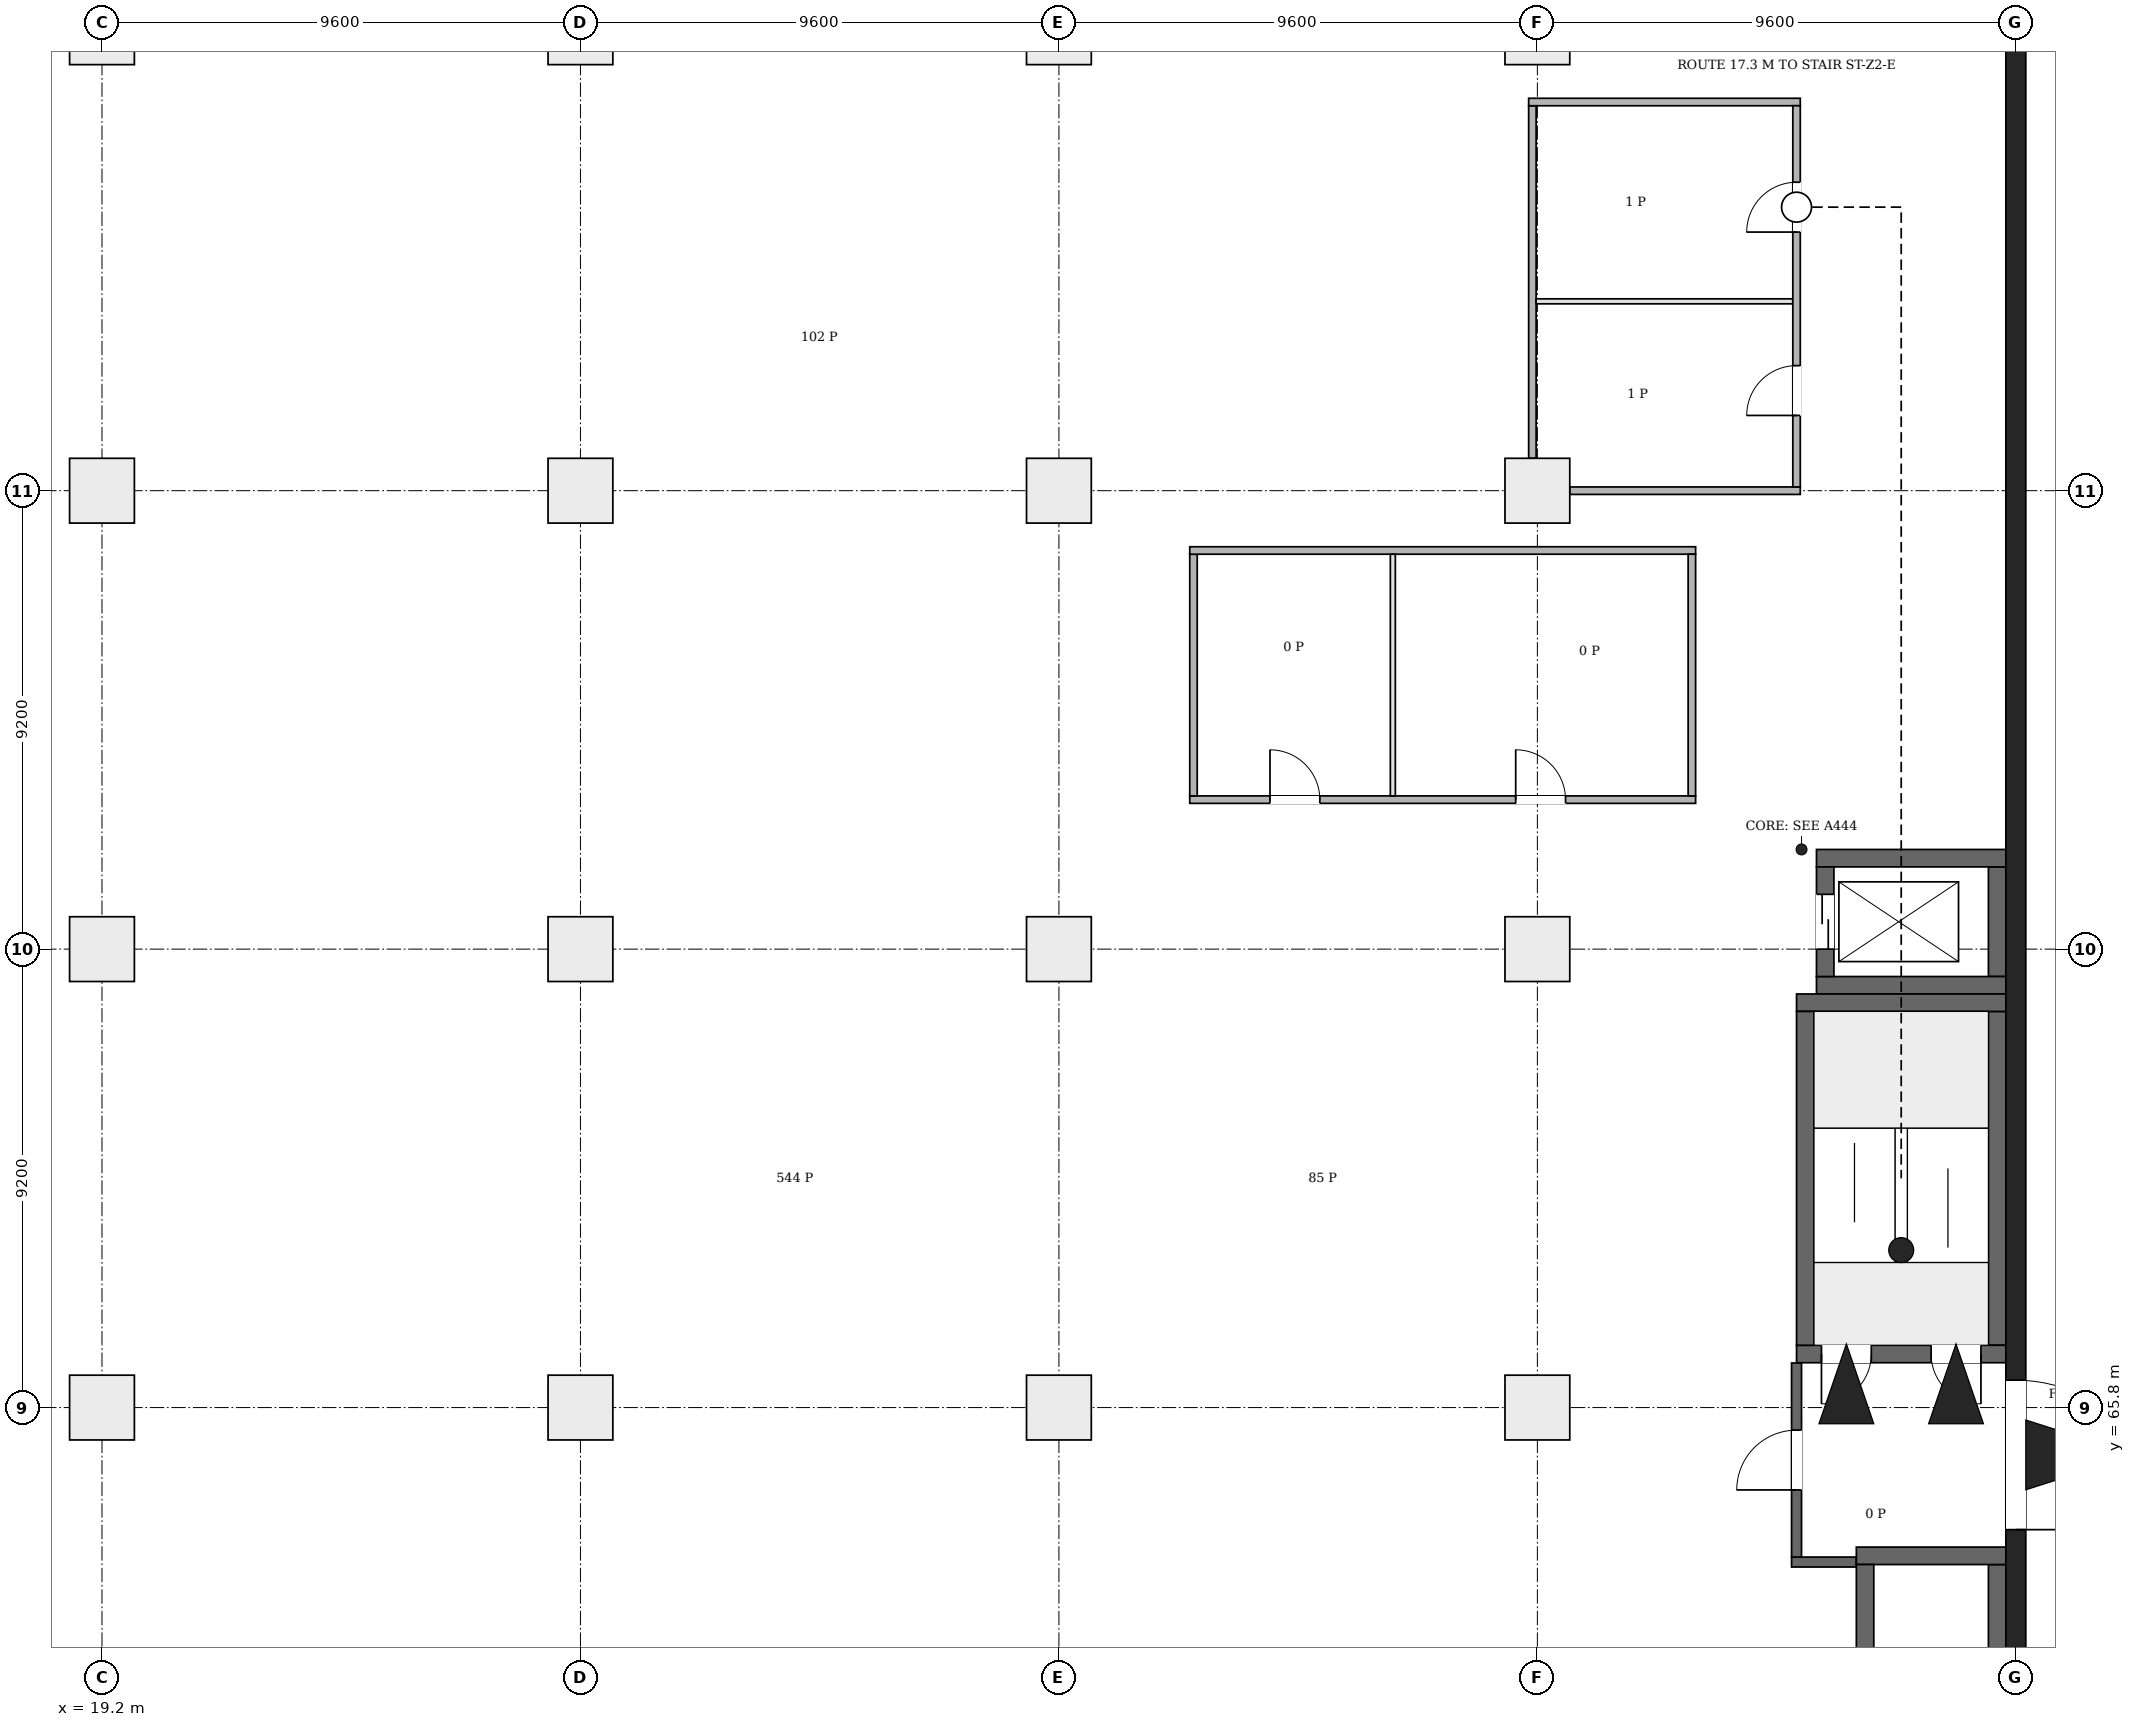
"""IFC4 building model, lengths in metres.
Left out: names, types, materials, properties, quantities, classifications, styles, units other than length and angle.
Written with IfcOpenShell. Run it as: python <this file> out.ifc"""

import sys

from ifc_helpers import new_model, si_unit, direction, frame, frame_2d, origin, origin_2d, place, context, subcontext, project, spatial, rectangle, extrude, element, fill, save


model = new_model("IFC4")
c1 = context("Model", 3, precision=1e-05, world=origin(), true_north=direction((0.0, 1.0)))
c2 = subcontext(c1, "Body", "Model", "MODEL_VIEW")
j1 = project(units=[si_unit("LENGTHUNIT", "METRE"), si_unit("PLANEANGLEUNIT", "RADIAN")], contexts=[c1])
p1 = place(None, origin())
s1 = spatial("IfcSite", under=j1, at=p1, CompositionType="ELEMENT")
p2 = place(p1, origin())
s2 = spatial("IfcBuilding", under=s1, at=p2, CompositionType="ELEMENT")
p3 = place(p2, origin())
s3 = spatial("IfcBuildingStorey", under=s2, at=p3, CompositionType="ELEMENT", Elevation=0.0)
p4 = place(p3, frame((57.6, 46.72, 0.0), z_axis=(0.0, 0.0, 1.0), x_axis=(0.0, 1.0, 0.0)))
e1 = element("IfcWall", 1, at=p4, inside=s3, PredefinedType="SHEAR", context=c2, shape_type="SweptSolid", body=[
    extrude(rectangle(XDim=47.36, YDim=0.4, at=frame_2d((23.68, 0.0))), origin(), (0.0, 0.0, 1.0), 6.5),
])
p5 = place(p4, frame((16.63, 0.0, 0.0)))
e2 = element("IfcOpeningElement", 2, at=p5, cuts=e1, PredefinedType="OPENING", context=c2, shape_type="SweptSolid", body=[
    extrude(rectangle(XDim=3.0, YDim=2.4, at=frame_2d((1.5, 1.2))), frame((0.0, 0.21, 0.0), z_axis=(0.0, -1.0, 0.0), x_axis=(1.0, 0.0, 0.0)), (0.0, 0.0, 1.0), 0.42),
])
p6 = place(p3, frame((53.2, 66.875, 0.0), z_axis=(0.0, 0.0, 1.0), x_axis=(1.0, 0.0, 0.0)))
e3 = element("IfcWall", 3, at=p6, inside=s3, PredefinedType="SHEAR", context=c2, shape_type="SweptSolid", body=[
    extrude(rectangle(XDim=4.2, YDim=0.35, at=frame_2d((2.1, 0.0))), origin(), (0.0, 0.0, 1.0), 6.5),
])
p7 = place(p6, frame((0.5, 0.0, 0.0)))
e4 = element("IfcOpeningElement", 4, at=p7, cuts=e3, PredefinedType="OPENING", context=c2, shape_type="SweptSolid", body=[
    extrude(rectangle(XDim=1.0, YDim=2.1, at=frame_2d((0.5, 1.05))), frame((0.0, 0.185, 0.0), z_axis=(0.0, -1.0, 0.0), x_axis=(1.0, 0.0, 0.0)), (0.0, 0.0, 1.0), 0.37),
])
p8 = place(p6, frame((2.7, 0.0, 0.0)))
e5 = element("IfcOpeningElement", 5, at=p8, cuts=e3, PredefinedType="OPENING", context=c2, shape_type="SweptSolid", body=[
    extrude(rectangle(XDim=1.0, YDim=2.1, at=frame_2d((0.5, 1.05))), frame((0.0, 0.185, 0.0), z_axis=(0.0, -1.0, 0.0), x_axis=(1.0, 0.0, 0.0)), (0.0, 0.0, 1.0), 0.37),
])
p9 = place(p3, frame((53.2, 73.925, 0.0), z_axis=(0.0, 0.0, 1.0), x_axis=(1.0, 0.0, 0.0)))
e6 = element("IfcWall", 6, at=p9, inside=s3, PredefinedType="SHEAR", context=c2, shape_type="SweptSolid", body=[
    extrude(rectangle(XDim=4.2, YDim=0.35, at=frame_2d((2.1, 0.0))), origin(), (0.0, 0.0, 1.0), 6.5),
])
for number, where, z_axis, x_axis in (
    (7, (53.375, 67.05, 0.0), (0.0, 0.0, 1.0), (0.0, 1.0, 0.0)),
    (8, (57.225, 67.05, 0.0), (0.0, 0.0, 1.0), (0.0, 1.0, 0.0)),
):
    element("IfcWall", number, at=place(p3, frame(where, z_axis=z_axis, x_axis=x_axis)), inside=s3, PredefinedType="SHEAR", context=c2, shape_type="SweptSolid", body=[
        extrude(rectangle(XDim=6.7, YDim=0.35, at=frame_2d((3.35, 0.0))), origin(), (0.0, 0.0, 1.0), 6.5),
    ])
for number, where, z_axis, x_axis in (
    (9, (53.6, 74.275, 0.0), (0.0, 0.0, 1.0), (1.0, 0.0, 0.0)),
    (10, (53.6, 76.825, 0.0), (0.0, 0.0, 1.0), (1.0, 0.0, 0.0)),
):
    element("IfcWall", number, at=place(p3, frame(where, z_axis=z_axis, x_axis=x_axis)), inside=s3, PredefinedType="SHEAR", context=c2, shape_type="SweptSolid", body=[
        extrude(rectangle(XDim=3.8, YDim=0.35, at=frame_2d((1.9, 0.0))), origin(), (0.0, 0.0, 1.0), 6.5),
    ])
p10 = place(p3, frame((53.775, 74.45, 0.0), z_axis=(0.0, 0.0, 1.0), x_axis=(0.0, 1.0, 0.0)))
e11 = element("IfcWall", 11, at=p10, inside=s3, PredefinedType="SHEAR", context=c2, shape_type="SweptSolid", body=[
    extrude(rectangle(XDim=2.2, YDim=0.35, at=frame_2d((1.1, 0.0))), origin(), (0.0, 0.0, 1.0), 6.5),
])
p11 = place(p10, frame((0.55, 0.0, 0.0)))
e12 = element("IfcOpeningElement", 12, at=p11, cuts=e11, PredefinedType="OPENING", context=c2, shape_type="SweptSolid", body=[
    extrude(rectangle(XDim=1.1, YDim=2.1, at=frame_2d((0.55, 1.05))), frame((0.0, 0.185, 0.0), z_axis=(0.0, -1.0, 0.0), x_axis=(1.0, 0.0, 0.0)), (0.0, 0.0, 1.0), 0.37),
])
p12 = place(p3, frame((57.225, 74.45, 0.0), z_axis=(0.0, 0.0, 1.0), x_axis=(0.0, 1.0, 0.0)))
e13 = element("IfcWall", 13, at=p12, inside=s3, PredefinedType="SHEAR", context=c2, shape_type="SweptSolid", body=[
    extrude(rectangle(XDim=2.2, YDim=0.35, at=frame_2d((1.1, 0.0))), origin(), (0.0, 0.0, 1.0), 6.5),
])
p13 = place(p3, frame((54.4, 62.825, 0.0), z_axis=(0.0, 0.0, 1.0), x_axis=(1.0, 0.0, 0.0)))
e14 = element("IfcWall", 14, at=p13, inside=s3, PredefinedType="SHEAR", context=c2, shape_type="SweptSolid", body=[
    extrude(rectangle(XDim=3.0, YDim=0.35, at=frame_2d((1.5, 0.0))), origin(), (0.0, 0.0, 1.0), 6.5),
])
for number, where, z_axis, x_axis in (
    (15, (54.575, 58.35, 0.0), (0.0, 0.0, 1.0), (0.0, 1.0, 0.0)),
    (16, (57.225, 58.35, 0.0), (0.0, 0.0, 1.0), (0.0, 1.0, 0.0)),
):
    element("IfcWall", number, at=place(p3, frame(where, z_axis=z_axis, x_axis=x_axis)), inside=s3, PredefinedType="SHEAR", context=c2, shape_type="SweptSolid", body=[
        extrude(rectangle(XDim=4.3, YDim=0.35, at=frame_2d((2.15, 0.0))), origin(), (0.0, 0.0, 1.0), 6.5),
    ])
for number, where, z_axis, x_axis in (
    (17, (19.2, 65.8, 0.0), (0.0, 0.0, 1.0), (1.0, 0.0, 0.0)),
    (18, (28.8, 65.8, 0.0), (0.0, 0.0, 1.0), (1.0, 0.0, 0.0)),
    (19, (38.4, 65.8, 0.0), (0.0, 0.0, 1.0), (1.0, 0.0, 0.0)),
    (20, (48.0, 65.8, 0.0), (0.0, 0.0, 1.0), (1.0, 0.0, 0.0)),
    (21, (19.2, 75.0, 0.0), (0.0, 0.0, 1.0), (1.0, 0.0, 0.0)),
    (22, (28.8, 75.0, 0.0), (0.0, 0.0, 1.0), (1.0, 0.0, 0.0)),
    (23, (38.4, 75.0, 0.0), (0.0, 0.0, 1.0), (1.0, 0.0, 0.0)),
    (24, (48.0, 75.0, 0.0), (0.0, 0.0, 1.0), (1.0, 0.0, 0.0)),
    (25, (19.2, 84.2, 0.0), (0.0, 0.0, 1.0), (1.0, 0.0, 0.0)),
    (26, (28.8, 84.2, 0.0), (0.0, 0.0, 1.0), (1.0, 0.0, 0.0)),
    (27, (38.4, 84.2, 0.0), (0.0, 0.0, 1.0), (1.0, 0.0, 0.0)),
    (28, (48.0, 84.2, 0.0), (0.0, 0.0, 1.0), (1.0, 0.0, 0.0)),
    (29, (19.2, 93.4, 0.0), (0.0, 0.0, 1.0), (1.0, 0.0, 0.0)),
    (30, (28.8, 93.4, 0.0), (0.0, 0.0, 1.0), (1.0, 0.0, 0.0)),
    (31, (38.4, 93.4, 0.0), (0.0, 0.0, 1.0), (1.0, 0.0, 0.0)),
    (32, (48.0, 93.4, 0.0), (0.0, 0.0, 1.0), (1.0, 0.0, 0.0)),
):
    element("IfcColumn", number, at=place(p3, frame(where, z_axis=z_axis, x_axis=x_axis)), inside=s3, PredefinedType="COLUMN", context=c2, shape_type="SweptSolid", body=[
        extrude(rectangle(XDim=1.3, YDim=1.3, at=origin_2d()), origin(), (0.0, 0.0, 1.0), 6.5),
    ])
p14 = place(p3, frame((41.025, 78.0, 0.0), z_axis=(0.0, 0.0, 1.0), x_axis=(1.0, 0.0, 0.0)))
e33 = element("IfcWall", 33, at=p14, inside=s3, PredefinedType="PARTITIONING", context=c2, shape_type="SweptSolid", body=[
    extrude(rectangle(XDim=10.15, YDim=0.15, at=frame_2d((5.075, 0.0))), origin(), (0.0, 0.0, 1.0), 6.05),
])
p15 = place(p14, frame((6.54, 0.0, 0.0)))
e34 = element("IfcOpeningElement", 34, at=p15, cuts=e33, PredefinedType="OPENING", context=c2, shape_type="SweptSolid", body=[
    extrude(rectangle(XDim=1.0, YDim=2.1, at=frame_2d((0.5, 1.05))), frame((0.0, 0.085, 0.0), z_axis=(0.0, -1.0, 0.0), x_axis=(1.0, 0.0, 0.0)), (0.0, 0.0, 1.0), 0.17),
])
p16 = place(p14, frame((1.61, 0.0, 0.0)))
e35 = element("IfcOpeningElement", 35, at=p16, cuts=e33, PredefinedType="OPENING", context=c2, shape_type="SweptSolid", body=[
    extrude(rectangle(XDim=1.0, YDim=2.1, at=frame_2d((0.5, 1.05))), frame((0.0, 0.085, 0.0), z_axis=(0.0, -1.0, 0.0), x_axis=(1.0, 0.0, 0.0)), (0.0, 0.0, 1.0), 0.17),
])
p17 = place(p3, frame((41.1, 78.075, 0.0), z_axis=(0.0, 0.0, 1.0), x_axis=(0.0, 1.0, 0.0)))
e36 = element("IfcWall", 36, at=p17, inside=s3, PredefinedType="PARTITIONING", context=c2, shape_type="SweptSolid", body=[
    extrude(rectangle(XDim=4.85, YDim=0.15, at=frame_2d((2.425, 0.0))), origin(), (0.0, 0.0, 1.0), 6.05),
])
p18 = place(p3, frame((41.025, 83.0, 0.0), z_axis=(0.0, 0.0, 1.0), x_axis=(1.0, 0.0, 0.0)))
e37 = element("IfcWall", 37, at=p18, inside=s3, PredefinedType="PARTITIONING", context=c2, shape_type="SweptSolid", body=[
    extrude(rectangle(XDim=10.15, YDim=0.15, at=frame_2d((5.075, 0.0))), origin(), (0.0, 0.0, 1.0), 6.05),
])
p19 = place(p3, frame((45.1, 78.075, 0.0), z_axis=(0.0, 0.0, 1.0), x_axis=(0.0, 1.0, 0.0)))
e38 = element("IfcWall", 38, at=p19, inside=s3, PredefinedType="PARTITIONING", context=c2, shape_type="SweptSolid", body=[
    extrude(rectangle(XDim=4.85, YDim=0.1, at=frame_2d((2.425, 0.0))), origin(), (0.0, 0.0, 1.0), 6.05),
])
p20 = place(p3, frame((47.9, 84.85, 0.0), z_axis=(0.0, 0.0, 1.0), x_axis=(0.0, 1.0, 0.0)))
e39 = element("IfcWall", 39, at=p20, inside=s3, PredefinedType="PARTITIONING", context=c2, shape_type="SweptSolid", body=[
    extrude(rectangle(XDim=7.075, YDim=0.15, at=frame_2d((3.538, 0.0))), origin(), (0.0, 0.0, 1.0), 5.65),
])
p21 = place(p3, frame((47.825, 92.0, 0.0), z_axis=(0.0, 0.0, 1.0), x_axis=(1.0, 0.0, 0.0)))
e40 = element("IfcWall", 40, at=p21, inside=s3, PredefinedType="PARTITIONING", context=c2, shape_type="SweptSolid", body=[
    extrude(rectangle(XDim=5.45, YDim=0.15, at=frame_2d((2.725, 0.0))), origin(), (0.0, 0.0, 1.0), 6.05),
])
p22 = place(p3, frame((47.975, 88.0, 0.0), z_axis=(0.0, 0.0, 1.0), x_axis=(1.0, 0.0, 0.0)))
e41 = element("IfcWall", 41, at=p22, inside=s3, PredefinedType="PARTITIONING", context=c2, shape_type="SweptSolid", body=[
    extrude(rectangle(XDim=5.15, YDim=0.1, at=frame_2d((2.575, 0.0))), origin(), (0.0, 0.0, 1.0), 6.05),
])
p23 = place(p3, frame((48.65, 84.2, 0.0), z_axis=(0.0, 0.0, 1.0), x_axis=(1.0, 0.0, 0.0)))
e42 = element("IfcWall", 42, at=p23, inside=s3, PredefinedType="PARTITIONING", context=c2, shape_type="SweptSolid", body=[
    extrude(rectangle(XDim=4.625, YDim=0.15, at=frame_2d((2.312, 0.0))), origin(), (0.0, 0.0, 1.0), 5.65),
])
p24 = place(p3, frame((51.1, 78.075, 0.0), z_axis=(0.0, 0.0, 1.0), x_axis=(0.0, 1.0, 0.0)))
e43 = element("IfcWall", 43, at=p24, inside=s3, PredefinedType="PARTITIONING", context=c2, shape_type="SweptSolid", body=[
    extrude(rectangle(XDim=4.85, YDim=0.15, at=frame_2d((2.425, 0.0))), origin(), (0.0, 0.0, 1.0), 6.05),
])
p25 = place(p3, frame((53.1, 62.7, 0.0), z_axis=(0.0, 0.0, 1.0), x_axis=(1.0, 0.0, 0.0)))
e44 = element("IfcWall", 44, at=p25, inside=s3, PredefinedType="PARTITIONING", context=c2, shape_type="SweptSolid", body=[
    extrude(rectangle(XDim=1.294, YDim=0.2, at=frame_2d((0.647, 0.0))), origin(), (0.0, 0.0, 1.0), 6.05),
])
p26 = place(p3, frame((53.2, 62.8, 0.0), z_axis=(0.0, 0.0, 1.0), x_axis=(0.0, 1.0, 0.0)))
e45 = element("IfcWall", 45, at=p26, inside=s3, PredefinedType="PARTITIONING", context=c2, shape_type="SweptSolid", body=[
    extrude(rectangle(XDim=3.894, YDim=0.2, at=frame_2d((1.947, 0.0))), origin(), (0.0, 0.0, 1.0), 6.05),
])
p27 = place(p26, frame((1.347, 0.0, 0.0)))
e46 = element("IfcOpeningElement", 46, at=p27, cuts=e45, PredefinedType="OPENING", context=c2, shape_type="SweptSolid", body=[
    extrude(rectangle(XDim=1.2, YDim=2.1, at=frame_2d((0.6, 1.05))), frame((0.0, 0.11, 0.0), z_axis=(0.0, -1.0, 0.0), x_axis=(1.0, 0.0, 0.0)), (0.0, 0.0, 1.0), 0.22),
])
p28 = place(p3, frame((53.2, 84.275, 0.0), z_axis=(0.0, 0.0, 1.0), x_axis=(0.0, 1.0, 0.0)))
e47 = element("IfcWall", 47, at=p28, inside=s3, PredefinedType="PARTITIONING", context=c2, shape_type="SweptSolid", body=[
    extrude(rectangle(XDim=7.65, YDim=0.15, at=frame_2d((3.825, 0.0))), origin(), (0.0, 0.0, 1.0), 6.05),
])
p29 = place(p28, frame((1.435, 0.0, 0.0)))
e48 = element("IfcOpeningElement", 48, at=p29, cuts=e47, PredefinedType="OPENING", context=c2, shape_type="SweptSolid", body=[
    extrude(rectangle(XDim=1.0, YDim=2.1, at=frame_2d((0.5, 1.05))), frame((0.0, 0.085, 0.0), z_axis=(0.0, -1.0, 0.0), x_axis=(1.0, 0.0, 0.0)), (0.0, 0.0, 1.0), 0.17),
])
p30 = place(p28, frame((5.115, 0.0, 0.0)))
e49 = element("IfcOpeningElement", 49, at=p30, cuts=e47, PredefinedType="OPENING", context=c2, shape_type="SweptSolid", body=[
    extrude(rectangle(XDim=1.0, YDim=2.1, at=frame_2d((0.5, 1.05))), frame((0.0, 0.085, 0.0), z_axis=(0.0, -1.0, 0.0), x_axis=(1.0, 0.0, 0.0)), (0.0, 0.0, 1.0), 0.17),
])
p31 = place(p5, frame((3.0, 0.0, 0.0), z_axis=(0.0, 0.0, 1.0), x_axis=(-1.0, 0.0, 0.0)))
e50 = element("IfcDoor", 50, at=p31, inside=s3, OperationType="DOUBLE_DOOR_SINGLE_SWING", PredefinedType="DOOR", context=c2, shape_type="SweptSolid", body=[
    extrude(rectangle(XDim=3.0, YDim=2.4, at=frame_2d((1.5, 1.2))), frame((0.0, 0.025, 0.0), z_axis=(0.0, -1.0, 0.0), x_axis=(1.0, 0.0, 0.0)), (0.0, 0.0, 1.0), 0.05),
])
fill(e2, e50)
p32 = place(p7, origin())
e51 = element("IfcDoor", 51, at=p32, inside=s3, OperationType="SINGLE_SWING_LEFT", PredefinedType="DOOR", context=c2, shape_type="SweptSolid", body=[
    extrude(rectangle(XDim=1.0, YDim=2.1, at=frame_2d((0.5, 1.05))), frame((0.0, 0.025, 0.0), z_axis=(0.0, -1.0, 0.0), x_axis=(1.0, 0.0, 0.0)), (0.0, 0.0, 1.0), 0.05),
])
fill(e4, e51)
p33 = place(p8, origin())
e52 = element("IfcDoor", 52, at=p33, inside=s3, OperationType="SINGLE_SWING_RIGHT", PredefinedType="DOOR", context=c2, shape_type="SweptSolid", body=[
    extrude(rectangle(XDim=1.0, YDim=2.1, at=frame_2d((0.5, 1.05))), frame((0.0, 0.025, 0.0), z_axis=(0.0, -1.0, 0.0), x_axis=(1.0, 0.0, 0.0)), (0.0, 0.0, 1.0), 0.05),
])
fill(e5, e52)
p34 = place(p11, origin())
e53 = element("IfcDoor", 53, at=p34, inside=s3, OperationType="DOUBLE_DOOR_SLIDING", PredefinedType="DOOR", context=c2, shape_type="SweptSolid", body=[
    extrude(rectangle(XDim=1.1, YDim=2.1, at=frame_2d((0.55, 1.05))), frame((0.0, 0.025, 0.0), z_axis=(0.0, -1.0, 0.0), x_axis=(1.0, 0.0, 0.0)), (0.0, 0.0, 1.0), 0.05),
])
fill(e12, e53)
p35 = place(p15, origin())
e54 = element("IfcDoor", 54, at=p35, inside=s3, OperationType="SINGLE_SWING_RIGHT", PredefinedType="DOOR", context=c2, shape_type="SweptSolid", body=[
    extrude(rectangle(XDim=1.0, YDim=2.1, at=frame_2d((0.5, 1.05))), frame((0.0, 0.025, 0.0), z_axis=(0.0, -1.0, 0.0), x_axis=(1.0, 0.0, 0.0)), (0.0, 0.0, 1.0), 0.05),
])
fill(e34, e54)
p36 = place(p16, origin())
e55 = element("IfcDoor", 55, at=p36, inside=s3, OperationType="SINGLE_SWING_LEFT", PredefinedType="DOOR", context=c2, shape_type="SweptSolid", body=[
    extrude(rectangle(XDim=1.0, YDim=2.1, at=frame_2d((0.5, 1.05))), frame((0.0, 0.025, 0.0), z_axis=(0.0, -1.0, 0.0), x_axis=(1.0, 0.0, 0.0)), (0.0, 0.0, 1.0), 0.05),
])
fill(e35, e55)
p37 = place(p29, origin())
e56 = element("IfcDoor", 56, at=p37, inside=s3, OperationType="SINGLE_SWING_LEFT", PredefinedType="DOOR", context=c2, shape_type="SweptSolid", body=[
    extrude(rectangle(XDim=1.0, YDim=2.1, at=frame_2d((0.5, 1.05))), frame((0.0, 0.025, 0.0), z_axis=(0.0, -1.0, 0.0), x_axis=(1.0, 0.0, 0.0)), (0.0, 0.0, 1.0), 0.05),
])
fill(e48, e56)
p38 = place(p30, origin())
e57 = element("IfcDoor", 57, at=p38, inside=s3, OperationType="SINGLE_SWING_RIGHT", PredefinedType="DOOR", context=c2, shape_type="SweptSolid", body=[
    extrude(rectangle(XDim=1.0, YDim=2.1, at=frame_2d((0.5, 1.05))), frame((0.0, 0.025, 0.0), z_axis=(0.0, -1.0, 0.0), x_axis=(1.0, 0.0, 0.0)), (0.0, 0.0, 1.0), 0.05),
])
fill(e49, e57)
p39 = place(p27, origin())
e58 = element("IfcDoor", 58, at=p39, inside=s3, OperationType="SINGLE_SWING_RIGHT", PredefinedType="DOOR", context=c2, shape_type="SweptSolid", body=[
    extrude(rectangle(XDim=1.2, YDim=2.1, at=frame_2d((0.6, 1.05))), frame((0.0, 0.025, 0.0), z_axis=(0.0, -1.0, 0.0), x_axis=(1.0, 0.0, 0.0)), (0.0, 0.0, 1.0), 0.05),
])
fill(e46, e58)
save(model, sys.argv[1])
